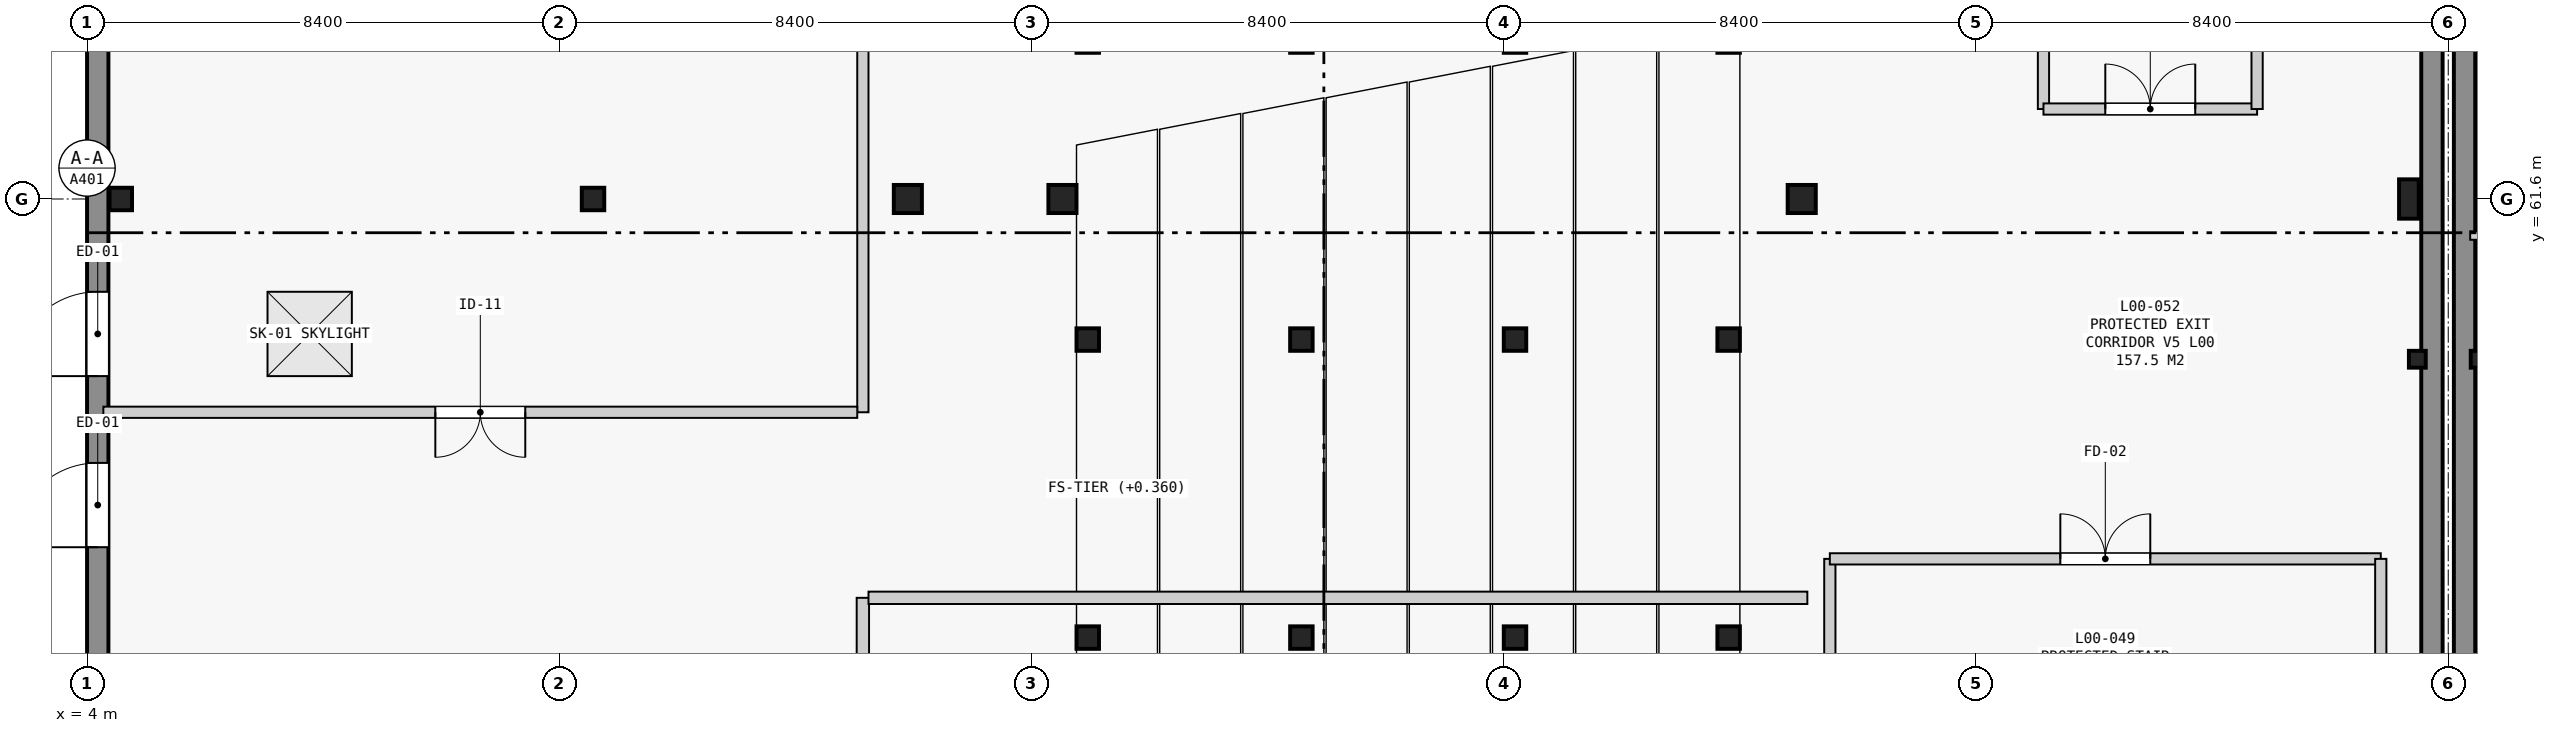
"""IFC4 building model, lengths in metres.
Left out: names, types, materials, properties, quantities, classifications, styles, units other than length and angle.
Written with IfcOpenShell. Run it as: python <this file> out.ifc"""

import sys

from ifc_helpers import new_model, si_unit, direction, frame, frame_2d, origin, origin_2d, place, context, subcontext, project, spatial, rectangle, i_section, extrude, element, fill, save


model = new_model("IFC4")
c1 = context("Model", 3, precision=1e-05, world=origin(), true_north=direction((0.0, 1.0)))
c2 = subcontext(c1, "Body", "Model", "MODEL_VIEW")
j1 = project(units=[si_unit("LENGTHUNIT", "METRE"), si_unit("PLANEANGLEUNIT", "RADIAN")], contexts=[c1])
p1 = place(None, origin())
s1 = spatial("IfcSite", under=j1, at=p1, CompositionType="ELEMENT")
p2 = place(p1, origin())
s2 = spatial("IfcBuilding", under=s1, at=p2, CompositionType="ELEMENT")
p3 = place(p2, origin())
s3 = spatial("IfcBuildingStorey", under=s2, at=p3, CompositionType="ELEMENT", Elevation=0.0)
for number, where, z_axis, x_axis in (
    (1, (4.6, 61.6, 0.0), (0.0, 0.0, 1.0), (1.0, 0.0, 0.0)),
    (2, (13.0, 61.6, 0.0), (0.0, 0.0, 1.0), (1.0, 0.0, 0.0)),
):
    element("IfcColumn", number, at=place(p3, frame(where, z_axis=z_axis, x_axis=x_axis)), inside=s3, PredefinedType="COLUMN", context=c2, shape_type="SweptSolid", body=[
        extrude(rectangle(XDim=0.4, YDim=0.4, at=origin_2d()), origin(), (0.0, 0.0, 1.0), 5.4),
    ])
for number, where, z_axis, x_axis in (
    (3, (18.6, 61.6, 0.0), (0.0, 0.0, 1.0), (1.0, 0.0, 0.0)),
    (4, (21.35, 61.6, 0.0), (0.0, 0.0, 1.0), (1.0, 0.0, 0.0)),
    (5, (34.5, 61.6, 0.0), (0.0, 0.0, 1.0), (1.0, 0.0, 0.0)),
):
    element("IfcColumn", number, at=place(p3, frame(where, z_axis=z_axis, x_axis=x_axis)), inside=s3, PredefinedType="COLUMN", context=c2, shape_type="SweptSolid", body=[
        extrude(rectangle(XDim=0.5, YDim=0.5, at=origin_2d()), origin(), (0.0, 0.0, 1.0), 5.4),
    ])
p4 = place(p3, frame((45.3, 61.6, 0.0), z_axis=(0.0, 0.0, 1.0), x_axis=(1.0, 0.0, 0.0)))
e6 = element("IfcColumn", 6, at=p4, inside=s3, PredefinedType="COLUMN", context=c2, shape_type="SweptSolid", body=[
    extrude(rectangle(XDim=0.35, YDim=0.7, at=origin_2d()), origin(), (0.0, 0.0, 1.0), 5.4),
])
for number, where, z_axis, x_axis in (
    (7, (45.45, 58.75, 0.0), (0.0, 0.0, 1.0), (1.0, 0.0, 0.0)),
    (8, (46.55, 58.75, 0.0), (0.0, 0.0, 1.0), (1.0, 0.0, 0.0)),
):
    element("IfcColumn", number, at=place(p3, frame(where, z_axis=z_axis, x_axis=x_axis)), inside=s3, PredefinedType="COLUMN", context=c2, shape_type="SweptSolid", body=[
        extrude(i_section(OverallWidth=0.3, OverallDepth=0.3, WebThickness=0.011, FlangeThickness=0.019, FilletRadius=0.027, at=origin_2d()), origin(), (0.0, 0.0, 1.0), 5.4),
    ])
p5 = place(p3, frame((21.8, 53.8, 0.0), z_axis=(0.0, 0.0, 1.0), x_axis=(1.0, 0.0, 0.0)))
e9 = element("IfcColumn", 9, at=p5, inside=s3, PredefinedType="COLUMN", context=c2, shape_type="SweptSolid", body=[
    extrude(rectangle(XDim=0.4, YDim=0.4, at=origin_2d()), origin(), (0.0, 0.0, 1.0), 0.3),
])
p6 = place(p3, frame((25.6, 53.8, 0.0), z_axis=(0.0, 0.0, 1.0), x_axis=(1.0, 0.0, 0.0)))
e10 = element("IfcColumn", 10, at=p6, inside=s3, PredefinedType="COLUMN", context=c2, shape_type="SweptSolid", body=[
    extrude(rectangle(XDim=0.4, YDim=0.4, at=origin_2d()), origin(), (0.0, 0.0, 1.0), 1.15),
])
p7 = place(p3, frame((29.4, 53.8, 0.0), z_axis=(0.0, 0.0, 1.0), x_axis=(1.0, 0.0, 0.0)))
e11 = element("IfcColumn", 11, at=p7, inside=s3, PredefinedType="COLUMN", context=c2, shape_type="SweptSolid", body=[
    extrude(rectangle(XDim=0.4, YDim=0.4, at=origin_2d()), origin(), (0.0, 0.0, 1.0), 2.0),
])
p8 = place(p3, frame((33.2, 53.8, 0.0), z_axis=(0.0, 0.0, 1.0), x_axis=(1.0, 0.0, 0.0)))
e12 = element("IfcColumn", 12, at=p8, inside=s3, PredefinedType="COLUMN", context=c2, shape_type="SweptSolid", body=[
    extrude(rectangle(XDim=0.4, YDim=0.4, at=origin_2d()), origin(), (0.0, 0.0, 1.0), 2.85),
])
p9 = place(p3, frame((21.8, 59.1, 0.0), z_axis=(0.0, 0.0, 1.0), x_axis=(1.0, 0.0, 0.0)))
e13 = element("IfcColumn", 13, at=p9, inside=s3, PredefinedType="COLUMN", context=c2, shape_type="SweptSolid", body=[
    extrude(rectangle(XDim=0.4, YDim=0.4, at=origin_2d()), origin(), (0.0, 0.0, 1.0), 0.3),
])
p10 = place(p3, frame((25.6, 59.1, 0.0), z_axis=(0.0, 0.0, 1.0), x_axis=(1.0, 0.0, 0.0)))
e14 = element("IfcColumn", 14, at=p10, inside=s3, PredefinedType="COLUMN", context=c2, shape_type="SweptSolid", body=[
    extrude(rectangle(XDim=0.4, YDim=0.4, at=origin_2d()), origin(), (0.0, 0.0, 1.0), 1.15),
])
p11 = place(p3, frame((29.4, 59.1, 0.0), z_axis=(0.0, 0.0, 1.0), x_axis=(1.0, 0.0, 0.0)))
e15 = element("IfcColumn", 15, at=p11, inside=s3, PredefinedType="COLUMN", context=c2, shape_type="SweptSolid", body=[
    extrude(rectangle(XDim=0.4, YDim=0.4, at=origin_2d()), origin(), (0.0, 0.0, 1.0), 2.0),
])
p12 = place(p3, frame((33.2, 59.1, 0.0), z_axis=(0.0, 0.0, 1.0), x_axis=(1.0, 0.0, 0.0)))
e16 = element("IfcColumn", 16, at=p12, inside=s3, PredefinedType="COLUMN", context=c2, shape_type="SweptSolid", body=[
    extrude(rectangle(XDim=0.4, YDim=0.4, at=origin_2d()), origin(), (0.0, 0.0, 1.0), 2.85),
])
p13 = place(p3, frame((46.29, 42.69, 0.0), z_axis=(0.0, 0.0, 1.0), x_axis=(0.0, 1.0, 0.0)))
e17 = element("IfcWall", 17, at=p13, inside=s3, PredefinedType="STANDARD", context=c2, shape_type="SweptSolid", body=[
    extrude(rectangle(XDim=33.02, YDim=0.38, at=frame_2d((16.51, 0.0))), origin(), (0.0, 0.0, 1.0), 5.14),
])
p14 = place(p3, frame((4.19, 42.69, 0.0), z_axis=(0.0, 0.0, 1.0), x_axis=(0.0, 1.0, 0.0)))
e18 = element("IfcWall", 18, at=p14, inside=s3, PredefinedType="STANDARD", context=c2, shape_type="SweptSolid", body=[
    extrude(rectangle(XDim=33.02, YDim=0.38, at=frame_2d((16.51, 0.0))), origin(), (0.0, 0.0, 1.0), 5.14),
])
p15 = place(p14, frame((12.717, 0.0, 0.0)))
e19 = element("IfcOpeningElement", 19, at=p15, cuts=e18, PredefinedType="OPENING", context=c2, shape_type="SweptSolid", body=[
    extrude(rectangle(XDim=1.5, YDim=2.3, at=frame_2d((0.75, 1.15))), frame((0.0, 0.2, 0.0), z_axis=(0.0, -1.0, 0.0), x_axis=(1.0, 0.0, 0.0)), (0.0, 0.0, 1.0), 0.4),
])
p16 = place(p14, frame((22.174, 0.0, 0.0)))
e20 = element("IfcOpeningElement", 20, at=p16, cuts=e18, PredefinedType="OPENING", context=c2, shape_type="SweptSolid", body=[
    extrude(rectangle(XDim=3.2, YDim=3.6, at=frame_2d((1.6, 1.8))), frame((0.0, 0.2, 0.0), z_axis=(0.0, -1.0, 0.0), x_axis=(1.0, 0.0, 0.0)), (0.0, 0.0, 1.0), 0.4),
])
p17 = place(p14, frame((15.76, 0.0, 0.0)))
e21 = element("IfcOpeningElement", 21, at=p17, cuts=e18, PredefinedType="OPENING", context=c2, shape_type="SweptSolid", body=[
    extrude(rectangle(XDim=1.5, YDim=2.3, at=frame_2d((0.75, 1.15))), frame((0.0, 0.2, 0.0), z_axis=(0.0, -1.0, 0.0), x_axis=(1.0, 0.0, 0.0)), (0.0, 0.0, 1.0), 0.4),
])
p18 = place(p14, frame((4.31, 0.0, 0.0)))
e22 = element("IfcOpeningElement", 22, at=p18, cuts=e18, PredefinedType="OPENING", context=c2, shape_type="SweptSolid", body=[
    extrude(rectangle(XDim=1.5, YDim=2.3, at=frame_2d((0.75, 1.15))), frame((0.0, 0.2, 0.0), z_axis=(0.0, -1.0, 0.0), x_axis=(1.0, 0.0, 0.0)), (0.0, 0.0, 1.0), 0.4),
])
p19 = place(p14, frame((29.21, 0.0, 0.0)))
e23 = element("IfcOpeningElement", 23, at=p19, cuts=e18, PredefinedType="OPENING", context=c2, shape_type="SweptSolid", body=[
    extrude(rectangle(XDim=1.5, YDim=2.3, at=frame_2d((0.75, 1.15))), frame((0.0, 0.2, 0.0), z_axis=(0.0, -1.0, 0.0), x_axis=(1.0, 0.0, 0.0)), (0.0, 0.0, 1.0), 0.4),
])
p20 = place(p3, frame((45.71, 75.71, 0.0), z_axis=(0.0, 0.0, 1.0), x_axis=(0.0, -1.0, 0.0)))
e24 = element("IfcWall", 24, at=p20, inside=s3, PredefinedType="STANDARD", context=c2, shape_type="SweptSolid", body=[
    extrude(rectangle(XDim=33.02, YDim=0.38, at=frame_2d((16.51, 0.0))), origin(), (0.0, 0.0, 1.0), 5.14),
])
p21 = place(p3, frame((35.0, 51.8, 0.0), z_axis=(0.0, 0.0, 1.0), x_axis=(0.0, 1.0, 0.0)))
e25 = element("IfcWall", 25, at=p21, inside=s3, PredefinedType="STANDARD", context=c2, shape_type="SweptSolid", body=[
    extrude(rectangle(XDim=3.4, YDim=0.2, at=frame_2d((1.7, 0.0))), origin(), (0.0, 0.0, 1.0), 5.14),
])
p22 = place(p3, frame((35.0, 55.2, 0.0), z_axis=(0.0, 0.0, 1.0), x_axis=(1.0, 0.0, 0.0)))
e26 = element("IfcWall", 26, at=p22, inside=s3, PredefinedType="STANDARD", context=c2, shape_type="SweptSolid", body=[
    extrude(rectangle(XDim=9.8, YDim=0.2, at=frame_2d((4.9, 0.0))), origin(), (0.0, 0.0, 1.0), 5.14),
])
p23 = place(p22, frame((4.1, 0.0, 0.0)))
e27 = element("IfcOpeningElement", 27, at=p23, cuts=e26, PredefinedType="OPENING", context=c2, shape_type="SweptSolid", body=[
    extrude(rectangle(XDim=1.6, YDim=2.2, at=frame_2d((0.8, 1.1))), frame((0.0, 0.11, 0.0), z_axis=(0.0, -1.0, 0.0), x_axis=(1.0, 0.0, 0.0)), (0.0, 0.0, 1.0), 0.22),
])
p24 = place(p3, frame((44.8, 55.2, 0.0), z_axis=(0.0, 0.0, 1.0), x_axis=(0.0, -1.0, 0.0)))
e28 = element("IfcWall", 28, at=p24, inside=s3, PredefinedType="STANDARD", context=c2, shape_type="SweptSolid", body=[
    extrude(rectangle(XDim=3.4, YDim=0.2, at=frame_2d((1.7, 0.0))), origin(), (0.0, 0.0, 1.0), 5.14),
])
p25 = place(p3, frame((38.8, 66.6, 0.0), z_axis=(0.0, 0.0, 1.0), x_axis=(0.0, -1.0, 0.0)))
e29 = element("IfcWall", 29, at=p25, inside=s3, PredefinedType="STANDARD", context=c2, shape_type="SweptSolid", body=[
    extrude(rectangle(XDim=3.4, YDim=0.2, at=frame_2d((1.7, 0.0))), origin(), (0.0, 0.0, 1.0), 5.14),
])
p26 = place(p3, frame((38.8, 63.2, 0.0), z_axis=(0.0, 0.0, 1.0), x_axis=(1.0, 0.0, 0.0)))
e30 = element("IfcWall", 30, at=p26, inside=s3, PredefinedType="STANDARD", context=c2, shape_type="SweptSolid", body=[
    extrude(rectangle(XDim=3.8, YDim=0.2, at=frame_2d((1.9, 0.0))), origin(), (0.0, 0.0, 1.0), 5.14),
])
p27 = place(p26, frame((1.1, 0.0, 0.0)))
e31 = element("IfcOpeningElement", 31, at=p27, cuts=e30, PredefinedType="OPENING", context=c2, shape_type="SweptSolid", body=[
    extrude(rectangle(XDim=1.6, YDim=2.2, at=frame_2d((0.8, 1.1))), frame((0.0, 0.11, 0.0), z_axis=(0.0, -1.0, 0.0), x_axis=(1.0, 0.0, 0.0)), (0.0, 0.0, 1.0), 0.22),
])
p28 = place(p3, frame((42.6, 63.2, 0.0), z_axis=(0.0, 0.0, 1.0), x_axis=(0.0, 1.0, 0.0)))
e32 = element("IfcWall", 32, at=p28, inside=s3, PredefinedType="STANDARD", context=c2, shape_type="SweptSolid", body=[
    extrude(rectangle(XDim=3.4, YDim=0.2, at=frame_2d((1.7, 0.0))), origin(), (0.0, 0.0, 1.0), 5.14),
])
p29 = place(p3, frame((48.65, 60.95, 0.0), z_axis=(0.0, 0.0, 1.0), x_axis=(-1.0, 0.0, 0.0)))
e33 = element("IfcWall", 33, at=p29, inside=s3, PredefinedType="PARTITIONING", context=c2, shape_type="SweptSolid", body=[
    extrude(rectangle(XDim=2.26, YDim=0.15, at=frame_2d((1.13, 0.0))), origin(), (0.0, 0.0, 1.0), 5.14),
])
p30 = place(p3, frame((17.8, 75.61, 0.0), z_axis=(0.0, 0.0, 1.0), x_axis=(0.0, -1.0, 0.0)))
e34 = element("IfcWall", 34, at=p30, inside=s3, PredefinedType="STANDARD", context=c2, shape_type="SweptSolid", body=[
    extrude(rectangle(XDim=17.803, YDim=0.2, at=frame_2d((8.901, 0.0))), origin(), (0.0, 0.0, 1.0), 4.52),
])
p31 = place(p3, frame((17.7, 57.807, 0.0), z_axis=(0.0, 0.0, 1.0), x_axis=(-1.0, 0.0, 0.0)))
e35 = element("IfcWall", 35, at=p31, inside=s3, PredefinedType="STANDARD", context=c2, shape_type="SweptSolid", body=[
    extrude(rectangle(XDim=13.41, YDim=0.2, at=frame_2d((6.705, 0.0))), origin(), (0.0, 0.0, 1.0), 4.47),
])
p32 = place(p31, frame((5.905, 0.0, 0.0)))
e36 = element("IfcOpeningElement", 36, at=p32, cuts=e35, PredefinedType="OPENING", context=c2, shape_type="SweptSolid", body=[
    extrude(rectangle(XDim=1.6, YDim=2.25, at=frame_2d((0.8, 1.125))), frame((0.0, 0.11, 0.0), z_axis=(0.0, -1.0, 0.0), x_axis=(1.0, 0.0, 0.0)), (0.0, 0.0, 1.0), 0.22),
])
p33 = place(p3, frame((17.8, 42.79, 0.0), z_axis=(0.0, 0.0, 1.0), x_axis=(0.0, 1.0, 0.0)))
e37 = element("IfcWall", 37, at=p33, inside=s3, PredefinedType="STANDARD", context=c2, shape_type="SweptSolid", body=[
    extrude(rectangle(XDim=11.717, YDim=0.22, at=frame_2d((5.858, 0.0))), origin(), (0.0, 0.0, 1.0), 4.57),
])
p34 = place(p33, frame((3.215, 0.0, 0.0)))
e38 = element("IfcOpeningElement", 38, at=p34, cuts=e37, PredefinedType="OPENING", context=c2, shape_type="SweptSolid", body=[
    extrude(rectangle(XDim=1.0, YDim=2.15, at=frame_2d((0.5, 1.075))), frame((0.0, 0.12, 0.0), z_axis=(0.0, -1.0, 0.0), x_axis=(1.0, 0.0, 0.0)), (0.0, 0.0, 1.0), 0.24),
])
p35 = place(p3, frame((17.9, 54.507, 0.0), z_axis=(0.0, 0.0, 1.0), x_axis=(1.0, 0.0, 0.0)))
e39 = element("IfcWall", 39, at=p35, inside=s3, PredefinedType="STANDARD", context=c2, shape_type="SweptSolid", body=[
    extrude(rectangle(XDim=16.7, YDim=0.22, at=frame_2d((8.35, 0.0))), origin(), (0.0, 0.0, 1.0), 4.47),
])
p36 = place(p15, origin())
e40 = element("IfcDoor", 40, at=p36, inside=s3, OperationType="SINGLE_SWING_LEFT", PredefinedType="DOOR", context=c2, shape_type="SweptSolid", body=[
    extrude(rectangle(XDim=1.5, YDim=2.3, at=frame_2d((0.75, 1.15))), frame((0.0, 0.025, 0.0), z_axis=(0.0, -1.0, 0.0), x_axis=(1.0, 0.0, 0.0)), (0.0, 0.0, 1.0), 0.05),
])
fill(e19, e40)
p37 = place(p17, origin())
e41 = element("IfcDoor", 41, at=p37, inside=s3, OperationType="SINGLE_SWING_LEFT", PredefinedType="DOOR", context=c2, shape_type="SweptSolid", body=[
    extrude(rectangle(XDim=1.5, YDim=2.3, at=frame_2d((0.75, 1.15))), frame((0.0, 0.025, 0.0), z_axis=(0.0, -1.0, 0.0), x_axis=(1.0, 0.0, 0.0)), (0.0, 0.0, 1.0), 0.05),
])
fill(e21, e41)
p38 = place(p2, frame((0.0, 0.0, 26.7)))
p39 = place(p38, frame((0.0, 0.0, -21.56)))
p40 = place(p39, frame((7.96, 59.2, 0.0)))
p41 = place(p40, frame((0.0, 0.0, 0.21)))
e42 = element("IfcWindow", 42, at=p41, inside=s3, PartitioningType="SINGLE_PANEL", PredefinedType="SKYLIGHT", context=c2, shape_type="SweptSolid", body=[
    extrude(rectangle(XDim=1.5, YDim=1.5, at=origin_2d()), origin(), (0.0, 0.0, 1.0), 0.05),
])
p42 = place(p23, origin())
e43 = element("IfcDoor", 43, at=p42, inside=s3, OperationType="DOUBLE_DOOR_SINGLE_SWING", PredefinedType="DOOR", context=c2, shape_type="SweptSolid", body=[
    extrude(rectangle(XDim=1.6, YDim=2.2, at=frame_2d((0.8, 1.1))), frame((0.0, 0.025, 0.0), z_axis=(0.0, -1.0, 0.0), x_axis=(1.0, 0.0, 0.0)), (0.0, 0.0, 1.0), 0.05),
])
fill(e27, e43)
p43 = place(p27, origin())
e44 = element("IfcDoor", 44, at=p43, inside=s3, OperationType="DOUBLE_DOOR_SINGLE_SWING", PredefinedType="DOOR", context=c2, shape_type="SweptSolid", body=[
    extrude(rectangle(XDim=1.6, YDim=2.2, at=frame_2d((0.8, 1.1))), frame((0.0, 0.025, 0.0), z_axis=(0.0, -1.0, 0.0), x_axis=(1.0, 0.0, 0.0)), (0.0, 0.0, 1.0), 0.05),
])
fill(e31, e44)
p44 = place(p32, origin())
e45 = element("IfcDoor", 45, at=p44, inside=s3, OperationType="DOUBLE_DOOR_SINGLE_SWING", PredefinedType="DOOR", context=c2, shape_type="SweptSolid", body=[
    extrude(rectangle(XDim=1.6, YDim=2.25, at=frame_2d((0.8, 1.125))), frame((0.0, 0.025, 0.0), z_axis=(0.0, -1.0, 0.0), x_axis=(1.0, 0.0, 0.0)), (0.0, 0.0, 1.0), 0.05),
])
fill(e36, e45)
save(model, sys.argv[1])
